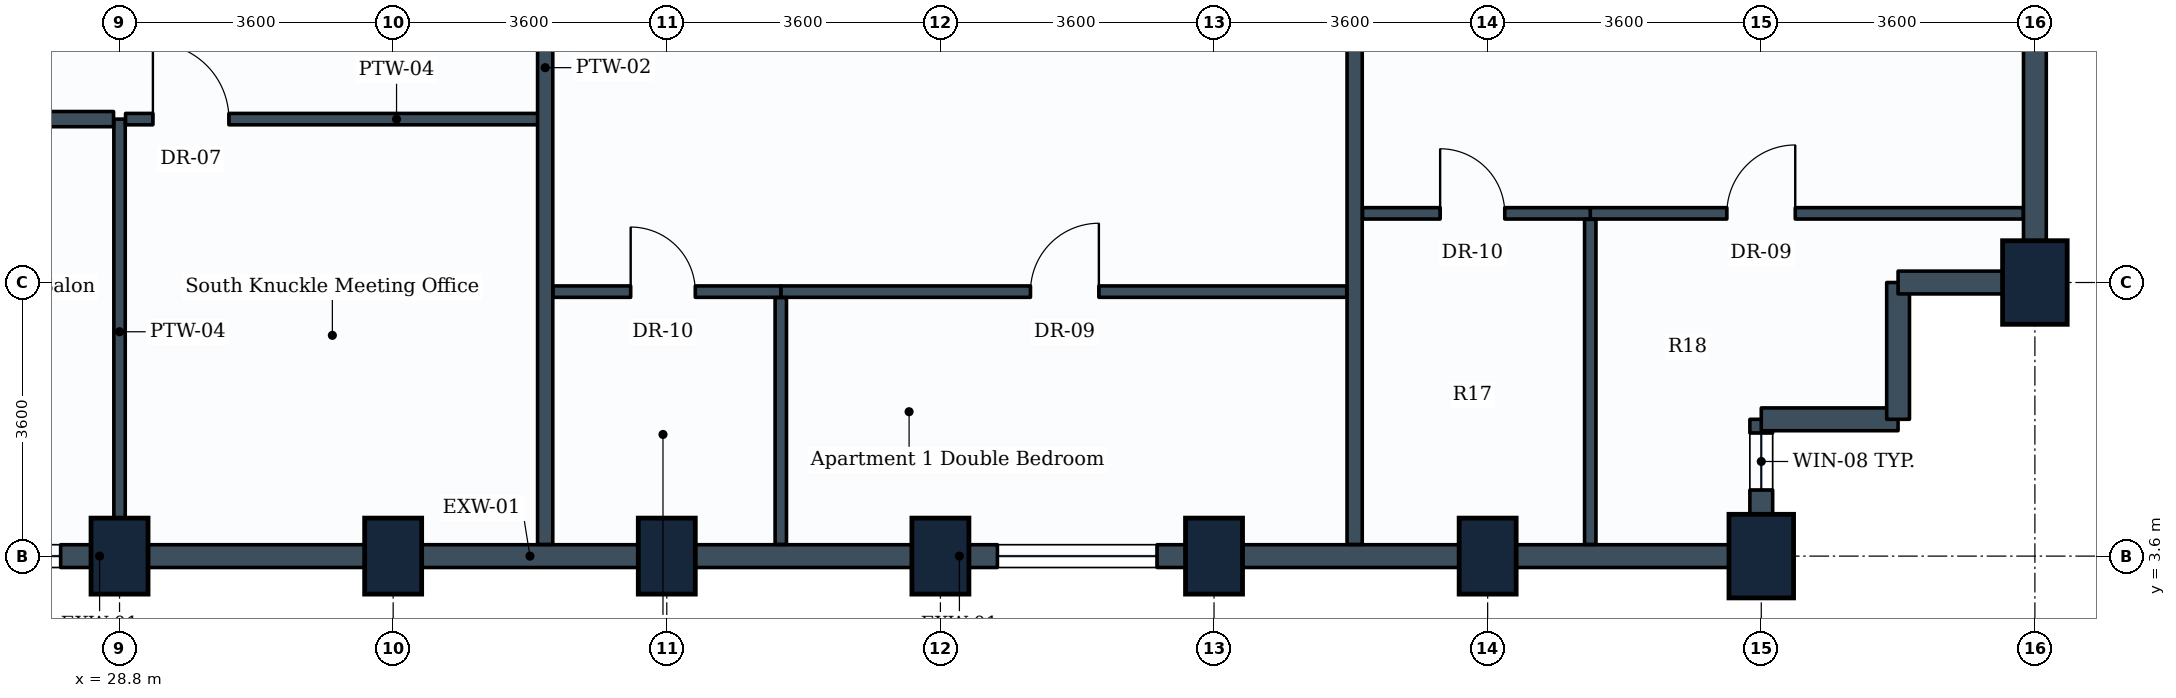
"""IFC4 building model, lengths in metres.
Left out: names, types, materials, properties, quantities, classifications, styles, units other than length and angle.
Written with IfcOpenShell. Run it as: python <this file> out.ifc"""

import sys

from ifc_helpers import new_model, si_unit, direction, frame, frame_2d, origin, origin_2d, place, context, subcontext, project, spatial, rectangle, extrude, element, fill, save


model = new_model("IFC4")
c1 = context("Model", 3, precision=1e-05, world=origin(), true_north=direction((0.0, 1.0)))
c2 = subcontext(c1, "Body", "Model", "MODEL_VIEW")
j1 = project(units=[si_unit("LENGTHUNIT", "METRE"), si_unit("PLANEANGLEUNIT", "RADIAN")], contexts=[c1])
p1 = place(None, origin())
s1 = spatial("IfcSite", under=j1, at=p1, CompositionType="ELEMENT")
p2 = place(p1, origin())
s2 = spatial("IfcBuilding", under=s1, at=p2, CompositionType="ELEMENT")
p3 = place(p2, frame((0.0, 0.0, 161.8)))
s3 = spatial("IfcBuildingStorey", under=s2, at=p3, CompositionType="ELEMENT", Elevation=161.8)
for number, where, z_axis, x_axis in (
    (1, (28.8, 3.6, 0.0), (0.0, 0.0, 1.0), (1.0, 0.0, 0.0)),
    (2, (32.4, 3.6, 0.0), (0.0, 0.0, 1.0), (1.0, 0.0, 0.0)),
    (3, (36.0, 3.6, 0.0), (0.0, 0.0, 1.0), (1.0, 0.0, 0.0)),
    (4, (39.6, 3.6, 0.0), (0.0, 0.0, 1.0), (1.0, 0.0, 0.0)),
    (5, (43.2, 3.6, 0.0), (0.0, 0.0, 1.0), (1.0, 0.0, 0.0)),
    (6, (46.8, 3.6, 0.0), (0.0, 0.0, 1.0), (1.0, 0.0, 0.0)),
):
    element("IfcColumn", number, at=place(p3, frame(where, z_axis=z_axis, x_axis=x_axis)), inside=s3, PredefinedType="COLUMN", context=c2, shape_type="SweptSolid", body=[
        extrude(rectangle(XDim=0.75, YDim=1.0, at=origin_2d()), origin(), (0.0, 0.0, 1.0), 3.8),
    ])
for number, where, z_axis, x_axis in (
    (7, (50.4, 3.6, 0.0), (0.0, 0.0, 1.0), (1.0, 0.0, 0.0)),
    (8, (54.0, 7.2, 0.0), (0.0, 0.0, 1.0), (1.0, 0.0, 0.0)),
):
    element("IfcColumn", number, at=place(p3, frame(where, z_axis=z_axis, x_axis=x_axis)), inside=s3, PredefinedType="COLUMN", context=c2, shape_type="SweptSolid", body=[
        extrude(rectangle(XDim=0.85, YDim=1.1, at=origin_2d()), origin(), (0.0, 0.0, 1.0), 3.8),
    ])
p4 = place(p3, frame((28.8, 3.6, 0.0), z_axis=(0.0, 0.0, 1.0), x_axis=(-1.0, 0.0, 0.0)))
e9 = element("IfcWall", 9, at=p4, inside=s3, PredefinedType="STANDARD", context=c2, shape_type="SweptSolid", body=[
    extrude(rectangle(XDim=3.6, YDim=0.3, at=frame_2d((1.8, 0.0))), origin(), (0.0, 0.0, 1.0), 2.93),
])
p5 = place(p4, frame((0.775, 0.0, 0.85)))
e10 = element("IfcOpeningElement", 10, at=p5, cuts=e9, PredefinedType="OPENING", context=c2, shape_type="SweptSolid", body=[
    extrude(rectangle(XDim=2.1, YDim=1.35, at=frame_2d((1.05, 0.675))), frame((0.0, 0.16, 0.0), z_axis=(0.0, -1.0, 0.0), x_axis=(1.0, 0.0, 0.0)), (0.0, 0.0, 1.0), 0.32),
])
p6 = place(p3, frame((32.4, 3.6, 0.0), z_axis=(0.0, 0.0, 1.0), x_axis=(-1.0, 0.0, 0.0)))
e11 = element("IfcWall", 11, at=p6, inside=s3, PredefinedType="STANDARD", context=c2, shape_type="SweptSolid", body=[
    extrude(rectangle(XDim=3.6, YDim=0.3, at=frame_2d((1.8, 0.0))), origin(), (0.0, 0.0, 1.0), 2.93),
])
for number, where, z_axis, x_axis in (
    (12, (36.0, 3.6, 0.0), (0.0, 0.0, 1.0), (-1.0, 0.0, 0.0)),
    (13, (39.6, 3.6, 0.0), (0.0, 0.0, 1.0), (-1.0, 0.0, 0.0)),
):
    element("IfcWall", number, at=place(p3, frame(where, z_axis=z_axis, x_axis=x_axis)), inside=s3, PredefinedType="STANDARD", context=c2, shape_type="SweptSolid", body=[
        extrude(rectangle(XDim=3.6, YDim=0.3, at=frame_2d((1.8, 0.0))), origin(), (0.0, 0.0, 1.0), 2.93),
    ])
p7 = place(p3, frame((43.2, 3.6, 0.0), z_axis=(0.0, 0.0, 1.0), x_axis=(-1.0, 0.0, 0.0)))
e14 = element("IfcWall", 14, at=p7, inside=s3, PredefinedType="STANDARD", context=c2, shape_type="SweptSolid", body=[
    extrude(rectangle(XDim=3.6, YDim=0.3, at=frame_2d((1.8, 0.0))), origin(), (0.0, 0.0, 1.0), 2.93),
])
p8 = place(p7, frame((0.75, 0.0, 0.85)))
e15 = element("IfcOpeningElement", 15, at=p8, cuts=e14, PredefinedType="OPENING", context=c2, shape_type="SweptSolid", body=[
    extrude(rectangle(XDim=2.1, YDim=1.35, at=frame_2d((1.05, 0.675))), frame((0.0, 0.16, 0.0), z_axis=(0.0, -1.0, 0.0), x_axis=(1.0, 0.0, 0.0)), (0.0, 0.0, 1.0), 0.32),
])
p9 = place(p3, frame((46.8, 3.6, 0.0), z_axis=(0.0, 0.0, 1.0), x_axis=(-1.0, 0.0, 0.0)))
e16 = element("IfcWall", 16, at=p9, inside=s3, PredefinedType="STANDARD", context=c2, shape_type="SweptSolid", body=[
    extrude(rectangle(XDim=3.6, YDim=0.3, at=frame_2d((1.8, 0.0))), origin(), (0.0, 0.0, 1.0), 2.93),
])
p10 = place(p3, frame((50.4, 3.6, 0.0), z_axis=(0.0, 0.0, 1.0), x_axis=(-1.0, 0.0, 0.0)))
e17 = element("IfcWall", 17, at=p10, inside=s3, PredefinedType="STANDARD", context=c2, shape_type="SweptSolid", body=[
    extrude(rectangle(XDim=3.6, YDim=0.3, at=frame_2d((1.8, 0.0))), origin(), (0.0, 0.0, 1.0), 2.93),
])
p11 = place(p3, frame((50.4, 5.4, 0.0), z_axis=(0.0, 0.0, 1.0), x_axis=(0.0, -1.0, 0.0)))
e18 = element("IfcWall", 18, at=p11, inside=s3, PredefinedType="STANDARD", context=c2, shape_type="SweptSolid", body=[
    extrude(rectangle(XDim=1.8, YDim=0.3, at=frame_2d((0.9, 0.0))), origin(), (0.0, 0.0, 1.0), 2.93),
])
p12 = place(p11, frame((0.18, 0.0, 0.85)))
e19 = element("IfcOpeningElement", 19, at=p12, cuts=e18, PredefinedType="OPENING", context=c2, shape_type="SweptSolid", body=[
    extrude(rectangle(XDim=0.75, YDim=1.05, at=frame_2d((0.375, 0.525))), frame((0.0, 0.16, 0.0), z_axis=(0.0, -1.0, 0.0), x_axis=(1.0, 0.0, 0.0)), (0.0, 0.0, 1.0), 0.32),
])
for number, where, z_axis, x_axis in (
    (20, (52.2, 5.4, 0.0), (0.0, 0.0, 1.0), (-1.0, 0.0, 0.0)),
    (21, (52.2, 7.2, 0.0), (0.0, 0.0, 1.0), (0.0, -1.0, 0.0)),
):
    element("IfcWall", number, at=place(p3, frame(where, z_axis=z_axis, x_axis=x_axis)), inside=s3, PredefinedType="STANDARD", context=c2, shape_type="SweptSolid", body=[
        extrude(rectangle(XDim=1.8, YDim=0.3, at=frame_2d((0.9, 0.0))), origin(), (0.0, 0.0, 1.0), 3.535),
    ])
p13 = place(p3, frame((54.0, 7.2, 0.0), z_axis=(0.0, 0.0, 1.0), x_axis=(-1.0, 0.0, 0.0)))
e22 = element("IfcWall", 22, at=p13, inside=s3, PredefinedType="STANDARD", context=c2, shape_type="SweptSolid", body=[
    extrude(rectangle(XDim=1.8, YDim=0.3, at=frame_2d((0.9, 0.0))), origin(), (0.0, 0.0, 1.0), 2.93),
])
p14 = place(p3, frame((54.0, 10.8, 0.0), z_axis=(0.0, 0.0, 1.0), x_axis=(0.0, -1.0, 0.0)))
e23 = element("IfcWall", 23, at=p14, inside=s3, PredefinedType="STANDARD", context=c2, shape_type="SweptSolid", body=[
    extrude(rectangle(XDim=3.6, YDim=0.3, at=frame_2d((1.8, 0.0))), origin(), (0.0, 0.0, 1.0), 2.93),
])
p15 = place(p3, frame((28.8, 9.35, 0.0), z_axis=(0.0, 0.0, 1.0), x_axis=(0.0, -1.0, 0.0)))
e24 = element("IfcWall", 24, at=p15, inside=s3, PredefinedType="PARTITIONING", context=c2, shape_type="SweptSolid", body=[
    extrude(rectangle(XDim=5.596, YDim=0.15, at=frame_2d((2.798, 0.0))), origin(), (0.0, 0.0, 1.0), 3.535),
])
p16 = place(p3, frame((13.13, 9.35, 0.0), z_axis=(0.0, 0.0, 1.0), x_axis=(1.0, 0.0, 0.0)))
e25 = element("IfcWall", 25, at=p16, inside=s3, PredefinedType="PARTITIONING", context=c2, shape_type="SweptSolid", body=[
    extrude(rectangle(XDim=15.591, YDim=0.2, at=frame_2d((7.795, 0.0))), origin(), (0.0, 0.0, 1.0), 3.17),
])
p17 = place(p3, frame((28.879, 9.35, 0.0), z_axis=(0.0, 0.0, 1.0), x_axis=(1.0, 0.0, 0.0)))
e26 = element("IfcWall", 26, at=p17, inside=s3, PredefinedType="PARTITIONING", context=c2, shape_type="SweptSolid", body=[
    extrude(rectangle(XDim=5.521, YDim=0.15, at=frame_2d((2.76, 0.0))), origin(), (0.0, 0.0, 1.0), 3.535),
])
p18 = place(p17, frame((0.36, 0.0, 0.0)))
e27 = element("IfcOpeningElement", 27, at=p18, cuts=e26, PredefinedType="OPENING", context=c2, shape_type="SweptSolid", body=[
    extrude(rectangle(XDim=1.0, YDim=2.1, at=frame_2d((0.5, 1.05))), frame((0.0, 0.085, 0.0), z_axis=(0.0, -1.0, 0.0), x_axis=(1.0, 0.0, 0.0)), (0.0, 0.0, 1.0), 0.17),
])
for number, where, z_axis, x_axis in (
    (28, (34.4, 3.754, 0.0), (0.0, 0.0, 1.0), (0.0, 1.0, 0.0)),
    (29, (45.05, 3.754, 0.0), (0.0, 0.0, 1.0), (0.0, 1.0, 0.0)),
):
    element("IfcWall", number, at=place(p3, frame(where, z_axis=z_axis, x_axis=x_axis)), inside=s3, PredefinedType="PARTITIONING", context=c2, shape_type="SweptSolid", body=[
        extrude(rectangle(XDim=12.546, YDim=0.2, at=frame_2d((6.273, 0.0))), origin(), (0.0, 0.0, 1.0), 2.93),
    ])
p19 = place(p3, frame((37.5, 7.08, 0.0), z_axis=(0.0, 0.0, 1.0), x_axis=(1.0, 0.0, 0.0)))
e30 = element("IfcWall", 30, at=p19, inside=s3, PredefinedType="PARTITIONING", context=c2, shape_type="SweptSolid", body=[
    extrude(rectangle(XDim=7.446, YDim=0.15, at=frame_2d((3.723, 0.0))), origin(), (0.0, 0.0, 1.0), 3.17),
])
p20 = place(p19, frame((3.285, 0.0, 0.0)))
e31 = element("IfcOpeningElement", 31, at=p20, cuts=e30, PredefinedType="OPENING", context=c2, shape_type="SweptSolid", body=[
    extrude(rectangle(XDim=0.9, YDim=2.1, at=frame_2d((0.45, 1.05))), frame((0.0, 0.085, 0.0), z_axis=(0.0, -1.0, 0.0), x_axis=(1.0, 0.0, 0.0)), (0.0, 0.0, 1.0), 0.17),
])
p21 = place(p3, frame((34.504, 7.08, 0.0), z_axis=(0.0, 0.0, 1.0), x_axis=(1.0, 0.0, 0.0)))
e32 = element("IfcWall", 32, at=p21, inside=s3, PredefinedType="PARTITIONING", context=c2, shape_type="SweptSolid", body=[
    extrude(rectangle(XDim=2.996, YDim=0.15, at=frame_2d((1.498, 0.0))), origin(), (0.0, 0.0, 1.0), 3.17),
])
p22 = place(p21, frame((1.021, 0.0, 0.0)))
e33 = element("IfcOpeningElement", 33, at=p22, cuts=e32, PredefinedType="OPENING", context=c2, shape_type="SweptSolid", body=[
    extrude(rectangle(XDim=0.85, YDim=2.1, at=frame_2d((0.425, 1.05))), frame((0.0, 0.085, 0.0), z_axis=(0.0, -1.0, 0.0), x_axis=(1.0, 0.0, 0.0)), (0.0, 0.0, 1.0), 0.17),
])
p23 = place(p3, frame((37.5, 3.754, 0.0), z_axis=(0.0, 0.0, 1.0), x_axis=(0.0, 1.0, 0.0)))
e34 = element("IfcWall", 34, at=p23, inside=s3, PredefinedType="PARTITIONING", context=c2, shape_type="SweptSolid", body=[
    extrude(rectangle(XDim=3.247, YDim=0.15, at=frame_2d((1.624, 0.0))), origin(), (0.0, 0.0, 1.0), 2.93),
])
p24 = place(p3, frame((48.15, 8.11, 0.0), z_axis=(0.0, 0.0, 1.0), x_axis=(1.0, 0.0, 0.0)))
e35 = element("IfcWall", 35, at=p24, inside=s3, PredefinedType="PARTITIONING", context=c2, shape_type="SweptSolid", body=[
    extrude(rectangle(XDim=5.696, YDim=0.15, at=frame_2d((2.848, 0.0))), origin(), (0.0, 0.0, 1.0), 2.93),
])
p25 = place(p24, frame((1.797, 0.0, 0.0)))
e36 = element("IfcOpeningElement", 36, at=p25, cuts=e35, PredefinedType="OPENING", context=c2, shape_type="SweptSolid", body=[
    extrude(rectangle(XDim=0.9, YDim=2.1, at=frame_2d((0.45, 1.05))), frame((0.0, 0.085, 0.0), z_axis=(0.0, -1.0, 0.0), x_axis=(1.0, 0.0, 0.0)), (0.0, 0.0, 1.0), 0.17),
])
p26 = place(p3, frame((45.154, 8.11, 0.0), z_axis=(0.0, 0.0, 1.0), x_axis=(1.0, 0.0, 0.0)))
e37 = element("IfcWall", 37, at=p26, inside=s3, PredefinedType="PARTITIONING", context=c2, shape_type="SweptSolid", body=[
    extrude(rectangle(XDim=2.996, YDim=0.15, at=frame_2d((1.498, 0.0))), origin(), (0.0, 0.0, 1.0), 3.17),
])
p27 = place(p26, frame((1.021, 0.0, 0.0)))
e38 = element("IfcOpeningElement", 38, at=p27, cuts=e37, PredefinedType="OPENING", context=c2, shape_type="SweptSolid", body=[
    extrude(rectangle(XDim=0.85, YDim=2.1, at=frame_2d((0.425, 1.05))), frame((0.0, 0.085, 0.0), z_axis=(0.0, -1.0, 0.0), x_axis=(1.0, 0.0, 0.0)), (0.0, 0.0, 1.0), 0.17),
])
p28 = place(p3, frame((48.15, 3.754, 0.0), z_axis=(0.0, 0.0, 1.0), x_axis=(0.0, 1.0, 0.0)))
e39 = element("IfcWall", 39, at=p28, inside=s3, PredefinedType="PARTITIONING", context=c2, shape_type="SweptSolid", body=[
    extrude(rectangle(XDim=4.277, YDim=0.15, at=frame_2d((2.139, 0.0))), origin(), (0.0, 0.0, 1.0), 2.93),
])
p29 = place(p5, origin())
e40 = element("IfcWindow", 40, at=p29, inside=s3, PartitioningType="SINGLE_PANEL", PredefinedType="WINDOW", context=c2, shape_type="SweptSolid", body=[
    extrude(rectangle(XDim=2.1, YDim=1.35, at=frame_2d((1.05, 0.675))), frame((0.0, 0.03, 0.0), z_axis=(0.0, -1.0, 0.0), x_axis=(1.0, 0.0, 0.0)), (0.0, 0.0, 1.0), 0.06),
])
fill(e10, e40)
p30 = place(p8, origin())
e41 = element("IfcWindow", 41, at=p30, inside=s3, PartitioningType="SINGLE_PANEL", PredefinedType="WINDOW", context=c2, shape_type="SweptSolid", body=[
    extrude(rectangle(XDim=2.1, YDim=1.35, at=frame_2d((1.05, 0.675))), frame((0.0, 0.03, 0.0), z_axis=(0.0, -1.0, 0.0), x_axis=(1.0, 0.0, 0.0)), (0.0, 0.0, 1.0), 0.06),
])
fill(e15, e41)
p31 = place(p18, origin())
e42 = element("IfcDoor", 42, at=p31, inside=s3, OperationType="SINGLE_SWING_LEFT", PredefinedType="DOOR", context=c2, shape_type="SweptSolid", body=[
    extrude(rectangle(XDim=1.0, YDim=2.1, at=frame_2d((0.5, 1.05))), frame((0.0, 0.025, 0.0), z_axis=(0.0, -1.0, 0.0), x_axis=(1.0, 0.0, 0.0)), (0.0, 0.0, 1.0), 0.05),
])
fill(e27, e42)
p32 = place(p20, origin())
e43 = element("IfcDoor", 43, at=p32, inside=s3, OperationType="SINGLE_SWING_RIGHT", PredefinedType="DOOR", context=c2, shape_type="SweptSolid", body=[
    extrude(rectangle(XDim=0.9, YDim=2.1, at=frame_2d((0.45, 1.05))), frame((0.0, 0.025, 0.0), z_axis=(0.0, -1.0, 0.0), x_axis=(1.0, 0.0, 0.0)), (0.0, 0.0, 1.0), 0.05),
])
fill(e31, e43)
p33 = place(p22, origin())
e44 = element("IfcDoor", 44, at=p33, inside=s3, OperationType="SINGLE_SWING_LEFT", PredefinedType="DOOR", context=c2, shape_type="SweptSolid", body=[
    extrude(rectangle(XDim=0.85, YDim=2.1, at=frame_2d((0.425, 1.05))), frame((0.0, 0.025, 0.0), z_axis=(0.0, -1.0, 0.0), x_axis=(1.0, 0.0, 0.0)), (0.0, 0.0, 1.0), 0.05),
])
fill(e33, e44)
p34 = place(p25, origin())
e45 = element("IfcDoor", 45, at=p34, inside=s3, OperationType="SINGLE_SWING_RIGHT", PredefinedType="DOOR", context=c2, shape_type="SweptSolid", body=[
    extrude(rectangle(XDim=0.9, YDim=2.1, at=frame_2d((0.45, 1.05))), frame((0.0, 0.025, 0.0), z_axis=(0.0, -1.0, 0.0), x_axis=(1.0, 0.0, 0.0)), (0.0, 0.0, 1.0), 0.05),
])
fill(e36, e45)
p35 = place(p27, origin())
e46 = element("IfcDoor", 46, at=p35, inside=s3, OperationType="SINGLE_SWING_LEFT", PredefinedType="DOOR", context=c2, shape_type="SweptSolid", body=[
    extrude(rectangle(XDim=0.85, YDim=2.1, at=frame_2d((0.425, 1.05))), frame((0.0, 0.025, 0.0), z_axis=(0.0, -1.0, 0.0), x_axis=(1.0, 0.0, 0.0)), (0.0, 0.0, 1.0), 0.05),
])
fill(e38, e46)
p36 = place(p12, origin())
e47 = element("IfcWindow", 47, at=p36, inside=s3, PartitioningType="SINGLE_PANEL", PredefinedType="WINDOW", context=c2, shape_type="SweptSolid", body=[
    extrude(rectangle(XDim=0.75, YDim=1.05, at=frame_2d((0.375, 0.525))), frame((0.0, 0.03, 0.0), z_axis=(0.0, -1.0, 0.0), x_axis=(1.0, 0.0, 0.0)), (0.0, 0.0, 1.0), 0.06),
])
fill(e19, e47)
save(model, sys.argv[1])
